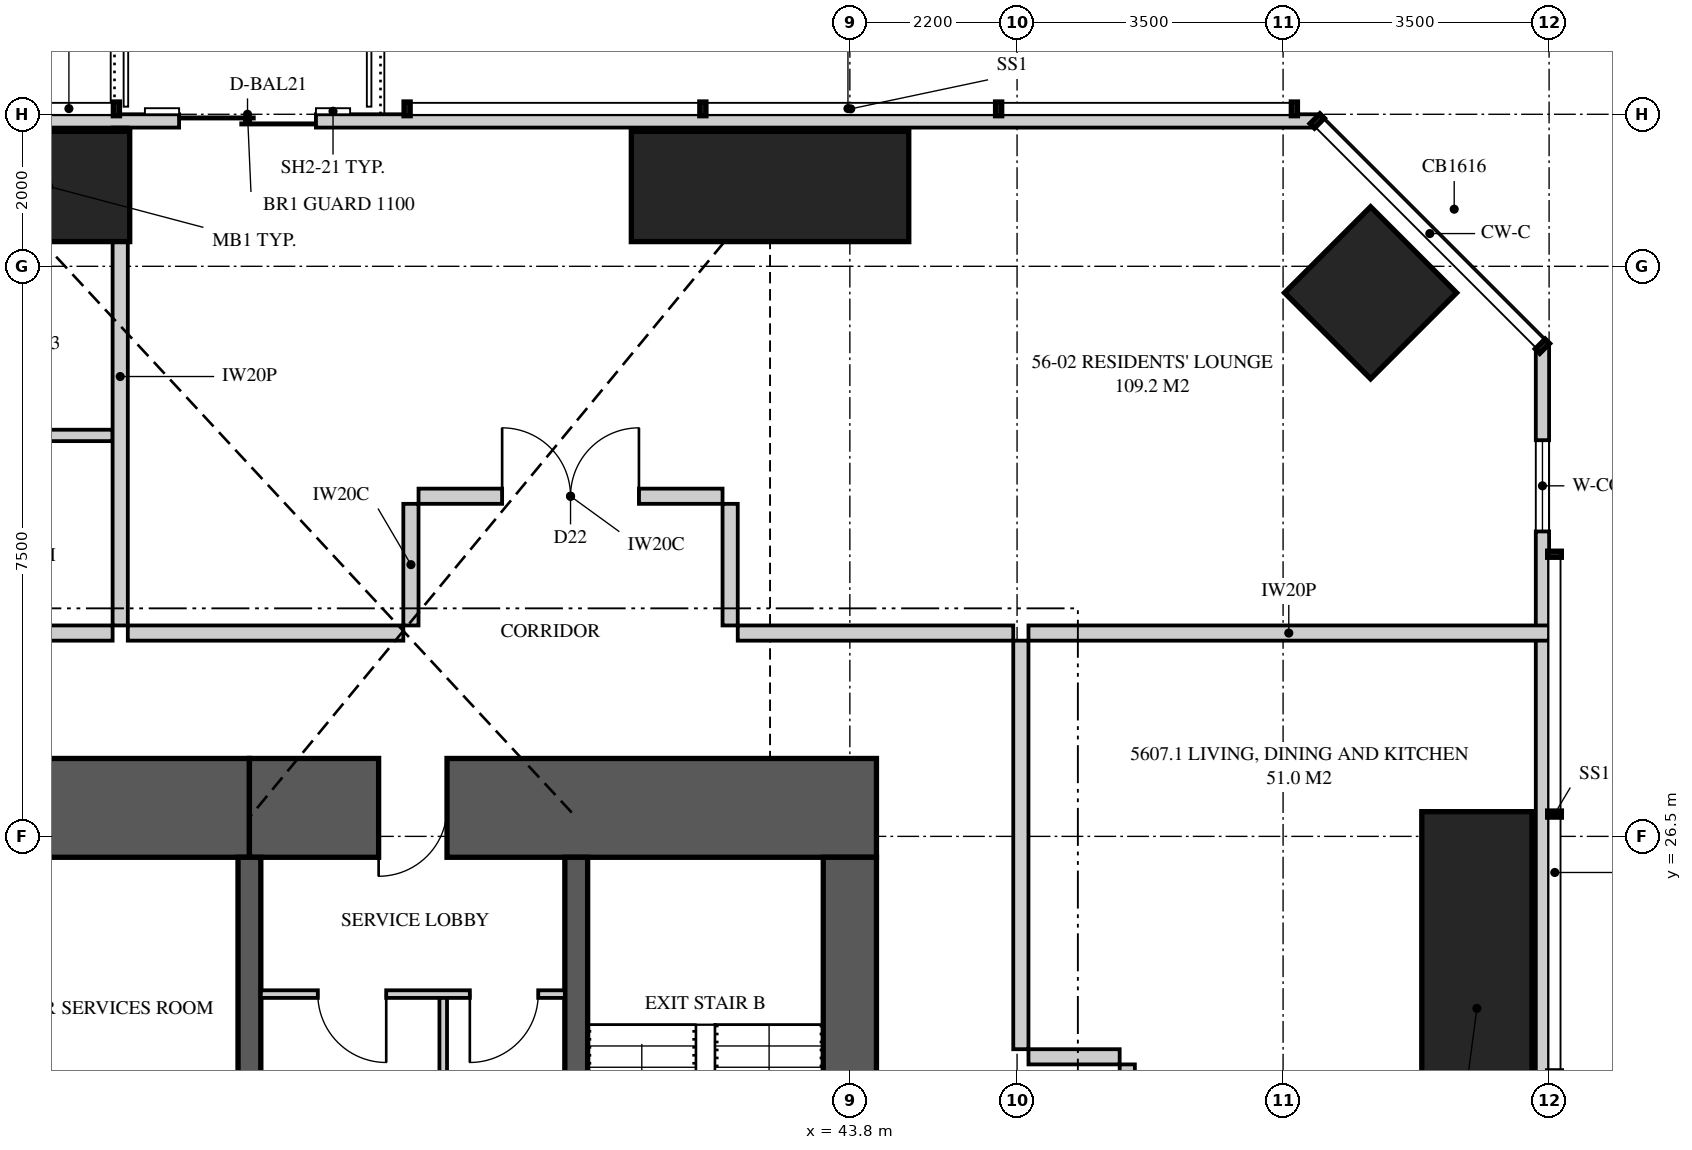
"""IFC4 building model, lengths in metres.
Left out: names, types, materials, properties, quantities, classifications, styles, units other than length and angle.
Written with IfcOpenShell. Run it as: python <this file> out.ifc"""

import sys

from ifc_helpers import new_model, si_unit, direction, frame, frame_2d, origin, origin_2d, place, context, subcontext, project, spatial, polyline, rectangle, hollow_rectangle, outline, extrude, element, fill, save


model = new_model("IFC4")
c1 = context("Model", 3, precision=1e-05, world=origin(), true_north=direction((0.0, 1.0)))
c2 = subcontext(c1, "Body", "Model", "MODEL_VIEW")
j1 = project(units=[si_unit("LENGTHUNIT", "METRE"), si_unit("PLANEANGLEUNIT", "RADIAN")], contexts=[c1])
p1 = place(None, origin())
s1 = spatial("IfcSite", under=j1, at=p1, CompositionType="ELEMENT")
p2 = place(p1, origin())
s2 = spatial("IfcBuilding", under=s1, at=p2, CompositionType="ELEMENT")
p3 = place(p2, frame((0.0, 0.0, 204.6)))
s3 = spatial("IfcBuildingStorey", under=s2, at=p3, CompositionType="ELEMENT", Elevation=204.6)
p4 = place(p3, frame((52.05, 25.0, 0.0), z_axis=(0.0, 0.0, 1.0), x_axis=(1.0, 0.0, 0.0)))
e1 = element("IfcColumn", 1, at=p4, inside=s3, PredefinedType="COLUMN", context=c2, shape_type="SweptSolid", body=[
    extrude(rectangle(XDim=1.45, YDim=3.65, at=origin_2d()), origin(), (0.0, 0.0, 1.0), 3.35),
])
p5 = place(p3, frame((50.652, 33.652, 0.0), z_axis=(0.0, 0.0, 1.0), x_axis=(-0.707106781187, -0.707106781187, 0.0)))
e2 = element("IfcColumn", 2, at=p5, inside=s3, PredefinedType="COLUMN", context=c2, shape_type="SweptSolid", body=[
    extrude(hollow_rectangle(XDim=1.6, YDim=1.6, WallThickness=0.125, at=origin_2d()), origin(), (0.0, 0.0, 1.0), 3.35),
])
for number, where, z_axis, x_axis in (
    (3, (42.75, 35.05, 0.0), (0.0, 0.0, 1.0), (0.0, 1.0, 0.0)),
    (4, (32.5, 35.05, 0.0), (0.0, 0.0, 1.0), (0.0, 1.0, 0.0)),
):
    element("IfcColumn", number, at=place(p3, frame(where, z_axis=z_axis, x_axis=x_axis)), inside=s3, PredefinedType="COLUMN", context=c2, shape_type="SweptSolid", body=[
        extrude(rectangle(XDim=1.45, YDim=3.65, at=origin_2d()), origin(), (0.0, 0.0, 1.0), 3.35),
    ])
p6 = place(p3, frame((44.15, 26.875, 0.0), z_axis=(0.0, 0.0, 1.0), x_axis=(-1.0, 0.0, 0.0)))
e5 = element("IfcWall", 5, at=p6, inside=s3, PredefinedType="SHEAR", context=c2, shape_type="SweptSolid", body=[
    extrude(rectangle(XDim=8.25, YDim=1.3, at=frame_2d((4.125, 0.0))), origin(), (0.0, 0.0, 1.0), 3.35),
])
p7 = place(p6, frame((5.65, 0.0, 0.0)))
e6 = element("IfcOpeningElement", 6, at=p7, cuts=e5, PredefinedType="OPENING", context=c2, shape_type="SweptSolid", body=[
    extrude(rectangle(XDim=0.9, YDim=2.1, at=frame_2d((0.45, 1.05))), frame((0.0, 0.66, 0.0), z_axis=(0.0, -1.0, 0.0), x_axis=(1.0, 0.0, 0.0)), (0.0, 0.0, 1.0), 1.32),
])
p8 = place(p3, frame((35.9, 26.875, 0.0), z_axis=(0.0, 0.0, 1.0), x_axis=(-1.0, 0.0, 0.0)))
e7 = element("IfcWall", 7, at=p8, inside=s3, PredefinedType="SHEAR", context=c2, shape_type="SweptSolid", body=[
    extrude(rectangle(XDim=4.3, YDim=1.3, at=frame_2d((2.15, 0.0))), origin(), (0.0, 0.0, 1.0), 3.35),
])
p9 = place(p3, frame((43.8, 19.3, 0.0), z_axis=(0.0, 0.0, 1.0), x_axis=(0.0, 1.0, 0.0)))
e8 = element("IfcWall", 8, at=p9, inside=s3, PredefinedType="SHEAR", context=c2, shape_type="SweptSolid", body=[
    extrude(rectangle(XDim=6.925, YDim=0.7, at=frame_2d((3.462, 0.0))), origin(), (0.0, 0.0, 1.0), 3.35),
])
p10 = place(p3, frame((35.9, 22.5, 0.0), z_axis=(0.0, 0.0, 1.0), x_axis=(0.0, 1.0, 0.0)))
e9 = element("IfcWall", 9, at=p10, inside=s3, PredefinedType="SHEAR", context=c2, shape_type="SweptSolid", body=[
    extrude(rectangle(XDim=3.725, YDim=0.3, at=frame_2d((1.863, 0.0))), origin(), (0.0, 0.0, 1.0), 3.35),
])
p11 = place(p3, frame((40.2, 18.5, 0.0), z_axis=(0.0, 0.0, 1.0), x_axis=(0.0, 1.0, 0.0)))
e10 = element("IfcWall", 10, at=p11, inside=s3, PredefinedType="SHEAR", context=c2, shape_type="SweptSolid", body=[
    extrude(rectangle(XDim=7.725, YDim=0.3, at=frame_2d((3.863, 0.0))), origin(), (0.0, 0.0, 1.0), 3.35),
])
p12 = place(p3, frame((52.913, 3.051, 0.0), z_axis=(0.0, 0.0, 1.0), x_axis=(0.0, 1.0, 0.0)))
e11 = element("IfcWall", 11, at=p12, inside=s3, PredefinedType="SOLIDWALL", context=c2, shape_type="SweptSolid", body=[
    extrude(outline(polyline([(0.0, 0.0), (29.897, 0.0), (29.897, 3.07), (19.763, 3.07), (19.763, 3.01), (19.617, 3.07), (0.0, 3.07), (0.0, 0.0)])), frame((0.0, 0.087, 0.0), z_axis=(0.0, -1.0, 0.0), x_axis=(1.0, 0.0, 0.0)), (0.0, 0.0, 1.0), 0.175),
])
p13 = place(p12, frame((1.137, 0.0, 0.4)))
e12 = element("IfcOpeningElement", 12, at=p13, cuts=e11, PredefinedType="OPENING", context=c2, shape_type="SweptSolid", body=[
    extrude(rectangle(XDim=2.4, YDim=1.7, at=frame_2d((1.2, 0.85))), frame((0.0, 0.097, 0.0), z_axis=(0.0, -1.0, 0.0), x_axis=(1.0, 0.0, 0.0)), (0.0, 0.0, 1.0), 0.195),
])
p14 = place(p12, frame((5.571, 0.0, 0.4)))
e13 = element("IfcOpeningElement", 13, at=p14, cuts=e11, PredefinedType="OPENING", context=c2, shape_type="SweptSolid", body=[
    extrude(rectangle(XDim=2.4, YDim=1.7, at=frame_2d((1.2, 0.85))), frame((0.0, 0.097, 0.0), z_axis=(0.0, -1.0, 0.0), x_axis=(1.0, 0.0, 0.0)), (0.0, 0.0, 1.0), 0.195),
])
p15 = place(p12, frame((11.879, 0.0, 0.4)))
e14 = element("IfcOpeningElement", 14, at=p15, cuts=e11, PredefinedType="OPENING", context=c2, shape_type="SweptSolid", body=[
    extrude(rectangle(XDim=1.8, YDim=1.7, at=frame_2d((0.9, 0.85))), frame((0.0, 0.097, 0.0), z_axis=(0.0, -1.0, 0.0), x_axis=(1.0, 0.0, 0.0)), (0.0, 0.0, 1.0), 0.195),
])
p16 = place(p12, frame((15.324, 0.0, 0.0)))
e15 = element("IfcOpeningElement", 15, at=p16, cuts=e11, PredefinedType="OPENING", context=c2, shape_type="SweptSolid", body=[
    extrude(rectangle(XDim=1.8, YDim=2.1, at=frame_2d((0.9, 1.05))), frame((0.0, 0.097, 0.0), z_axis=(0.0, -1.0, 0.0), x_axis=(1.0, 0.0, 0.0)), (0.0, 0.0, 1.0), 0.195),
])
p17 = place(p12, frame((18.224, 0.0, 0.4)))
e16 = element("IfcOpeningElement", 16, at=p17, cuts=e11, PredefinedType="OPENING", context=c2, shape_type="SweptSolid", body=[
    extrude(rectangle(XDim=1.8, YDim=1.7, at=frame_2d((0.9, 0.85))), frame((0.0, 0.097, 0.0), z_axis=(0.0, -1.0, 0.0), x_axis=(1.0, 0.0, 0.0)), (0.0, 0.0, 1.0), 0.195),
])
p18 = place(p12, frame((27.461, 0.0, 0.4)))
e17 = element("IfcOpeningElement", 17, at=p18, cuts=e11, PredefinedType="OPENING", context=c2, shape_type="SweptSolid", body=[
    extrude(rectangle(XDim=1.2, YDim=1.7, at=frame_2d((0.6, 0.85))), frame((0.0, 0.097, 0.0), z_axis=(0.0, -1.0, 0.0), x_axis=(1.0, 0.0, 0.0)), (0.0, 0.0, 1.0), 0.195),
])
p19 = place(p3, frame((49.949, 35.913, 0.0), z_axis=(0.0, 0.0, 1.0), x_axis=(-1.0, 0.0, 0.0)))
e18 = element("IfcWall", 18, at=p19, inside=s3, PredefinedType="SOLIDWALL", context=c2, shape_type="SweptSolid", body=[
    extrude(rectangle(XDim=34.897, YDim=0.175, at=frame_2d((17.449, 0.0))), origin(), (0.0, 0.0, 1.0), 3.07),
])
p20 = place(p19, frame((13.174, 0.0, 0.0)))
e19 = element("IfcOpeningElement", 19, at=p20, cuts=e18, PredefinedType="OPENING", context=c2, shape_type="SweptSolid", body=[
    extrude(rectangle(XDim=1.8, YDim=2.1, at=frame_2d((0.9, 1.05))), frame((0.0, 0.097, 0.0), z_axis=(0.0, -1.0, 0.0), x_axis=(1.0, 0.0, 0.0)), (0.0, 0.0, 1.0), 0.195),
])
p21 = place(p19, frame((19.374, 0.0, 0.4)))
e20 = element("IfcOpeningElement", 20, at=p21, cuts=e18, PredefinedType="OPENING", context=c2, shape_type="SweptSolid", body=[
    extrude(rectangle(XDim=1.8, YDim=1.7, at=frame_2d((0.9, 0.85))), frame((0.0, 0.097, 0.0), z_axis=(0.0, -1.0, 0.0), x_axis=(1.0, 0.0, 0.0)), (0.0, 0.0, 1.0), 0.195),
])
p22 = place(p19, frame((23.224, 0.0, 0.4)))
e21 = element("IfcOpeningElement", 21, at=p22, cuts=e18, PredefinedType="OPENING", context=c2, shape_type="SweptSolid", body=[
    extrude(rectangle(XDim=2.4, YDim=1.7, at=frame_2d((1.2, 0.85))), frame((0.0, 0.097, 0.0), z_axis=(0.0, -1.0, 0.0), x_axis=(1.0, 0.0, 0.0)), (0.0, 0.0, 1.0), 0.195),
])
p23 = place(p19, frame((32.399, 0.0, 0.4)))
e22 = element("IfcOpeningElement", 22, at=p23, cuts=e18, PredefinedType="OPENING", context=c2, shape_type="SweptSolid", body=[
    extrude(rectangle(XDim=1.8, YDim=1.7, at=frame_2d((0.9, 0.85))), frame((0.0, 0.097, 0.0), z_axis=(0.0, -1.0, 0.0), x_axis=(1.0, 0.0, 0.0)), (0.0, 0.0, 1.0), 0.195),
])
p24 = place(p3, frame((34.2, 35.825, 0.0), z_axis=(0.0, 0.0, 1.0), x_axis=(0.0, -1.0, 0.0)))
e23 = element("IfcWall", 23, at=p24, inside=s3, PredefinedType="PARTITIONING", context=c2, shape_type="SweptSolid", body=[
    extrude(outline(polyline([(0.0, 0.0), (6.55, 0.0), (6.55, 3.07), (3.062, 3.07), (3.062, 2.491), (2.152, 2.491), (2.152, 3.07), (1.275, 3.07), (1.275, 2.07), (0.275, 2.07), (0.275, 3.07), (0.0, 3.07), (0.0, 0.0)])), frame((0.0, 0.1, 0.0), z_axis=(0.0, -1.0, 0.0), x_axis=(1.0, 0.0, 0.0)), (0.0, 0.0, 1.0), 0.2),
])
p25 = place(p3, frame((28.4, 31.775, 0.0), z_axis=(0.0, 0.0, 1.0), x_axis=(1.0, 0.0, 0.0)))
e24 = element("IfcWall", 24, at=p25, inside=s3, PredefinedType="PLUMBINGWALL", context=c2, shape_type="SweptSolid", body=[
    extrude(outline(polyline([(0.0, 0.0), (5.7, 0.0), (5.7, 3.07), (4.356, 3.07), (4.356, 2.595), (3.844, 2.595), (3.844, 3.07), (1.015, 3.07), (1.015, 2.491), (0.162, 2.491), (0.162, 3.07), (0.0, 3.07), (0.0, 0.0)])), frame((0.0, 0.075, 0.0), z_axis=(0.0, -1.0, 0.0), x_axis=(1.0, 0.0, 0.0)), (0.0, 0.0, 1.0), 0.15),
])
p26 = place(p25, frame((0.4, 0.0, 0.0)))
e25 = element("IfcOpeningElement", 25, at=p26, cuts=e24, PredefinedType="OPENING", context=c2, shape_type="SweptSolid", body=[
    extrude(rectangle(XDim=0.9, YDim=2.1, at=frame_2d((0.45, 1.05))), frame((0.0, 0.085, 0.0), z_axis=(0.0, -1.0, 0.0), x_axis=(1.0, 0.0, 0.0)), (0.0, 0.0, 1.0), 0.17),
])
p27 = place(p3, frame((34.3, 29.175, 0.0), z_axis=(0.0, 0.0, 1.0), x_axis=(1.0, 0.0, 0.0)))
e26 = element("IfcWall", 26, at=p27, inside=s3, PredefinedType="PARTITIONING", context=c2, shape_type="SweptSolid", body=[
    extrude(outline(polyline([(0.0, 0.0), (3.625, 0.0), (3.625, 2.491), (3.213, 2.491), (3.213, 3.07), (0.0, 3.07), (0.0, 0.0)])), frame((0.0, 0.1, 0.0), z_axis=(0.0, -1.0, 0.0), x_axis=(1.0, 0.0, 0.0)), (0.0, 0.0, 1.0), 0.2),
])
p28 = place(p3, frame((46.15, 29.175, 0.0), z_axis=(0.0, 0.0, 1.0), x_axis=(1.0, 0.0, 0.0)))
e27 = element("IfcWall", 27, at=p28, inside=s3, PredefinedType="PARTITIONING", context=c2, shape_type="SweptSolid", body=[
    extrude(outline(polyline([(0.0, 0.0), (6.85, 0.0), (6.85, 3.07), (5.748, 3.07), (5.748, 2.07), (4.702, 2.07), (4.702, 3.07), (0.0, 3.07), (0.0, 0.0)])), frame((0.0, 0.1, 0.0), z_axis=(0.0, -1.0, 0.0), x_axis=(1.0, 0.0, 0.0)), (0.0, 0.0, 1.0), 0.2),
])
p29 = place(p3, frame((24.5, 29.175, 0.0), z_axis=(0.0, 0.0, 1.0), x_axis=(1.0, 0.0, 0.0)))
e28 = element("IfcWall", 28, at=p29, inside=s3, PredefinedType="PARTITIONING", context=c2, shape_type="SweptSolid", body=[
    extrude(outline(polyline([(0.0, 0.0), (9.6, 0.0), (9.6, 3.07), (8.257, 3.07), (8.257, 2.595), (7.743, 2.595), (7.743, 3.07), (4.837, 3.07), (4.837, 2.491), (3.9, 2.491), (3.9, 3.07), (2.154, 3.07), (2.154, 2.491), (1.247, 2.491), (1.247, 3.07), (0.0, 3.07), (0.0, 0.0)])), frame((0.0, 0.1, 0.0), z_axis=(0.0, -1.0, 0.0), x_axis=(1.0, 0.0, 0.0)), (0.0, 0.0, 1.0), 0.2),
])
p30 = place(p3, frame((46.05, 23.7, 0.0), z_axis=(0.0, 0.0, 1.0), x_axis=(0.0, 1.0, 0.0)))
e29 = element("IfcWall", 29, at=p30, inside=s3, PredefinedType="PARTITIONING", context=c2, shape_type="SweptSolid", body=[
    extrude(outline(polyline([(0.0, 0.0), (5.375, 0.0), (5.375, 3.07), (1.512, 3.07), (1.512, 2.595), (1.088, 2.595), (1.088, 3.07), (0.0, 3.07), (0.0, 0.0)])), frame((0.0, 0.1, 0.0), z_axis=(0.0, -1.0, 0.0), x_axis=(1.0, 0.0, 0.0)), (0.0, 0.0, 1.0), 0.2),
])
p31 = place(p3, frame((47.45, 21.1, 0.0), z_axis=(0.0, 0.0, 1.0), x_axis=(0.0, 1.0, 0.0)))
e30 = element("IfcWall", 30, at=p31, inside=s3, PredefinedType="PARTITIONING", context=c2, shape_type="SweptSolid", body=[
    extrude(rectangle(XDim=2.4, YDim=0.2, at=frame_2d((1.2, 0.0))), origin(), (0.0, 0.0, 1.0), 3.07),
])
p32 = place(p31, frame((0.1, 0.0, 0.0)))
e31 = element("IfcOpeningElement", 31, at=p32, cuts=e30, PredefinedType="OPENING", context=c2, shape_type="SweptSolid", body=[
    extrude(rectangle(XDim=1.05, YDim=2.2, at=frame_2d((0.525, 1.1))), frame((0.0, 0.11, 0.0), z_axis=(0.0, -1.0, 0.0), x_axis=(1.0, 0.0, 0.0)), (0.0, 0.0, 1.0), 0.22),
])
p33 = place(p3, frame((46.15, 23.6, 0.0), z_axis=(0.0, 0.0, 1.0), x_axis=(1.0, 0.0, 0.0)))
e32 = element("IfcWall", 32, at=p33, inside=s3, PredefinedType="PARTITIONING", context=c2, shape_type="SweptSolid", body=[
    extrude(rectangle(XDim=1.2, YDim=0.2, at=frame_2d((0.6, 0.0))), origin(), (0.0, 0.0, 1.0), 3.07),
])
p34 = place(p3, frame((42.325, 29.175, 0.0), z_axis=(0.0, 0.0, 1.0), x_axis=(1.0, 0.0, 0.0)))
e33 = element("IfcWall", 33, at=p34, inside=s3, PredefinedType="PARTITIONING", context=c2, shape_type="SweptSolid", body=[
    extrude(outline(polyline([(0.0, 0.0), (3.625, 0.0), (3.625, 3.07), (1.135, 3.07), (1.135, 2.47), (0.0, 2.47), (0.0, 3.07), (0.0, 0.0)])), frame((0.0, 0.1, 0.0), z_axis=(0.0, -1.0, 0.0), x_axis=(1.0, 0.0, 0.0)), (0.0, 0.0, 1.0), 0.2),
])
p35 = place(p3, frame((38.125, 30.975, 0.0), z_axis=(0.0, 0.0, 1.0), x_axis=(1.0, 0.0, 0.0)))
e34 = element("IfcWall", 34, at=p35, inside=s3, PredefinedType="PARTITIONING", context=c2, shape_type="SweptSolid", body=[
    extrude(outline(polyline([(0.0, 0.0), (4.0, 0.0), (4.0, 2.47), (3.915, 2.47), (3.915, 3.07), (1.651, 3.07), (1.651, 2.491), (0.873, 2.491), (0.873, 3.07), (0.0, 3.07), (0.0, 0.0)])), frame((0.0, 0.1, 0.0), z_axis=(0.0, -1.0, 0.0), x_axis=(1.0, 0.0, 0.0)), (0.0, 0.0, 1.0), 0.2),
])
p36 = place(p35, frame((1.1, 0.0, 0.0)))
e35 = element("IfcOpeningElement", 35, at=p36, cuts=e34, PredefinedType="OPENING", context=c2, shape_type="SweptSolid", body=[
    extrude(rectangle(XDim=1.8, YDim=2.1, at=frame_2d((0.9, 1.05))), frame((0.0, 0.11, 0.0), z_axis=(0.0, -1.0, 0.0), x_axis=(1.0, 0.0, 0.0)), (0.0, 0.0, 1.0), 0.22),
])
p37 = place(p3, frame((38.025, 29.275, 0.0), z_axis=(0.0, 0.0, 1.0), x_axis=(0.0, 1.0, 0.0)))
e36 = element("IfcWall", 36, at=p37, inside=s3, PredefinedType="PARTITIONING", context=c2, shape_type="SweptSolid", body=[
    extrude(outline(polyline([(0.0, 0.0), (1.6, 0.0), (1.6, 3.07), (0.542, 3.07), (0.542, 2.491), (0.0, 2.491), (0.0, 0.0)])), frame((0.0, 0.1, 0.0), z_axis=(0.0, -1.0, 0.0), x_axis=(1.0, 0.0, 0.0)), (0.0, 0.0, 1.0), 0.2),
])
p38 = place(p3, frame((42.225, 29.275, 0.0), z_axis=(0.0, 0.0, 1.0), x_axis=(0.0, 1.0, 0.0)))
e37 = element("IfcWall", 37, at=p38, inside=s3, PredefinedType="PARTITIONING", context=c2, shape_type="SweptSolid", body=[
    extrude(outline(polyline([(0.0, 0.0), (1.6, 0.0), (1.6, 3.07), (1.6, 2.47), (0.0, 2.47), (0.0, 3.07), (0.0, 0.0)])), frame((0.0, 0.1, 0.0), z_axis=(0.0, -1.0, 0.0), x_axis=(1.0, 0.0, 0.0)), (0.0, 0.0, 1.0), 0.2),
])
p39 = place(p3, frame((36.05, 24.425, 0.0), z_axis=(0.0, 0.0, 1.0), x_axis=(1.0, 0.0, 0.0)))
e38 = element("IfcWall", 38, at=p39, inside=s3, PredefinedType="PARTITIONING", context=c2, shape_type="SweptSolid", body=[
    extrude(rectangle(XDim=4.0, YDim=0.1, at=frame_2d((2.0, 0.0))), origin(), (0.0, 0.0, 1.0), 3.07),
])
p40 = place(p39, frame((0.75, 0.0, 0.0)))
e39 = element("IfcOpeningElement", 39, at=p40, cuts=e38, PredefinedType="OPENING", context=c2, shape_type="SweptSolid", body=[
    extrude(rectangle(XDim=0.9, YDim=2.1, at=frame_2d((0.45, 1.05))), frame((0.0, 0.06, 0.0), z_axis=(0.0, -1.0, 0.0), x_axis=(1.0, 0.0, 0.0)), (0.0, 0.0, 1.0), 0.12),
])
p41 = place(p39, frame((2.75, 0.0, 0.0)))
e40 = element("IfcOpeningElement", 40, at=p41, cuts=e38, PredefinedType="OPENING", context=c2, shape_type="SweptSolid", body=[
    extrude(rectangle(XDim=0.9, YDim=2.1, at=frame_2d((0.45, 1.05))), frame((0.0, 0.06, 0.0), z_axis=(0.0, -1.0, 0.0), x_axis=(1.0, 0.0, 0.0)), (0.0, 0.0, 1.0), 0.12),
])
p42 = place(p3, frame((38.45, 18.65, 0.0), z_axis=(0.0, 0.0, 1.0), x_axis=(0.0, 1.0, 0.0)))
e41 = element("IfcWall", 41, at=p42, inside=s3, PredefinedType="PARTITIONING", context=c2, shape_type="SweptSolid", body=[
    extrude(rectangle(XDim=5.725, YDim=0.1, at=frame_2d((2.863, 0.0))), origin(), (0.0, 0.0, 1.0), 3.07),
])
p43 = place(p18, origin())
e42 = element("IfcWindow", 42, at=p43, inside=s3, PartitioningType="SINGLE_PANEL", PredefinedType="WINDOW", context=c2, shape_type="SweptSolid", body=[
    extrude(rectangle(XDim=1.2, YDim=1.7, at=frame_2d((0.6, 0.85))), frame((0.0, 0.03, 0.0), z_axis=(0.0, -1.0, 0.0), x_axis=(1.0, 0.0, 0.0)), (0.0, 0.0, 1.0), 0.06),
])
fill(e17, e42)
p44 = place(p20, origin())
e43 = element("IfcDoor", 43, at=p44, inside=s3, OperationType="SLIDING_TO_LEFT", PredefinedType="DOOR", context=c2, shape_type="SweptSolid", body=[
    extrude(rectangle(XDim=1.8, YDim=2.1, at=frame_2d((0.9, 1.05))), frame((0.0, 0.025, 0.0), z_axis=(0.0, -1.0, 0.0), x_axis=(1.0, 0.0, 0.0)), (0.0, 0.0, 1.0), 0.05),
])
fill(e19, e43)
p45 = place(p36, origin())
e44 = element("IfcDoor", 44, at=p45, inside=s3, OperationType="DOUBLE_DOOR_SINGLE_SWING", PredefinedType="DOOR", context=c2, shape_type="SweptSolid", body=[
    extrude(rectangle(XDim=1.8, YDim=2.1, at=frame_2d((0.9, 1.05))), frame((0.0, 0.025, 0.0), z_axis=(0.0, -1.0, 0.0), x_axis=(1.0, 0.0, 0.0)), (0.0, 0.0, 1.0), 0.05),
])
fill(e35, e44)
p46 = place(p40, frame((0.9, 0.0, 0.0), z_axis=(0.0, 0.0, 1.0), x_axis=(-1.0, 0.0, 0.0)))
e45 = element("IfcDoor", 45, at=p46, inside=s3, OperationType="SINGLE_SWING_LEFT", PredefinedType="DOOR", context=c2, shape_type="SweptSolid", body=[
    extrude(rectangle(XDim=0.9, YDim=2.1, at=frame_2d((0.45, 1.05))), frame((0.0, 0.025, 0.0), z_axis=(0.0, -1.0, 0.0), x_axis=(1.0, 0.0, 0.0)), (0.0, 0.0, 1.0), 0.05),
])
fill(e39, e45)
p47 = place(p41, frame((0.9, 0.0, 0.0), z_axis=(0.0, 0.0, 1.0), x_axis=(-1.0, 0.0, 0.0)))
e46 = element("IfcDoor", 46, at=p47, inside=s3, OperationType="SINGLE_SWING_RIGHT", PredefinedType="DOOR", context=c2, shape_type="SweptSolid", body=[
    extrude(rectangle(XDim=0.9, YDim=2.1, at=frame_2d((0.45, 1.05))), frame((0.0, 0.025, 0.0), z_axis=(0.0, -1.0, 0.0), x_axis=(1.0, 0.0, 0.0)), (0.0, 0.0, 1.0), 0.05),
])
fill(e40, e46)
p48 = place(p7, origin())
e47 = element("IfcDoor", 47, at=p48, inside=s3, OperationType="SINGLE_SWING_RIGHT", PredefinedType="DOOR", context=c2, shape_type="SweptSolid", body=[
    extrude(rectangle(XDim=0.9, YDim=2.1, at=frame_2d((0.45, 1.05))), frame((0.0, 0.47, 0.0), z_axis=(0.0, -1.0, 0.0), x_axis=(1.0, 0.0, 0.0)), (0.0, 0.0, 1.0), 0.8),
])
fill(e6, e47)
save(model, sys.argv[1])
